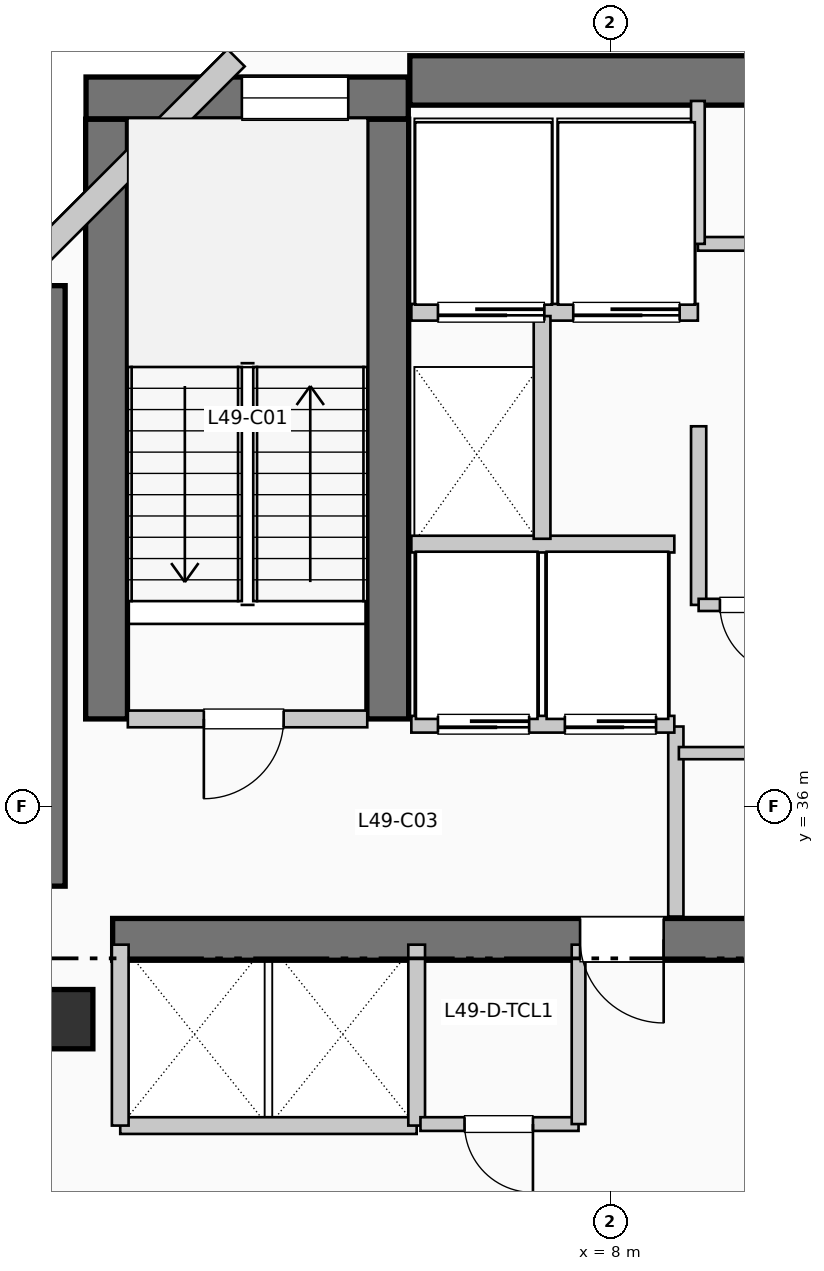
"""IFC4 building model, lengths in metres.
Left out: names, types, materials, properties, quantities, classifications, styles, units other than length and angle.
Written with IfcOpenShell. Run it as: python <this file> out.ifc"""

import sys

from ifc_helpers import new_model, si_unit, direction, frame, frame_2d, origin, origin_2d, place, context, subcontext, project, spatial, rectangle, extrude, element, fill, save


model = new_model("IFC4")
c1 = context("Model", 3, precision=1e-05, world=origin(), true_north=direction((0.0, 1.0)))
c2 = subcontext(c1, "Body", "Model", "MODEL_VIEW")
j1 = project(units=[si_unit("LENGTHUNIT", "METRE"), si_unit("PLANEANGLEUNIT", "RADIAN")], contexts=[c1])
p1 = place(None, origin())
s1 = spatial("IfcSite", under=j1, at=p1, CompositionType="ELEMENT")
p2 = place(p1, origin())
s2 = spatial("IfcBuilding", under=s1, at=p2, CompositionType="ELEMENT")
p3 = place(p2, frame((0.0, 0.0, 203.28)))
s3 = spatial("IfcBuildingStorey", under=s2, at=p3, CompositionType="ELEMENT", Elevation=203.28)
p4 = place(p3, frame((5.36, 45.55, 0.0), z_axis=(0.0, 0.0, 1.0), x_axis=(1.0, 0.0, 0.0)))
e1 = element("IfcWall", 1, at=p4, inside=s3, PredefinedType="SHEAR", context=c2, shape_type="SweptSolid", body=[
    extrude(rectangle(XDim=13.98, YDim=0.65, at=frame_2d((6.99, 0.0))), origin(), (0.0, 0.0, 1.0), 3.96),
])
p5 = place(p3, frame((0.5, 34.95, 0.0), z_axis=(0.0, 0.0, 1.0), x_axis=(0.0, 1.0, 0.0)))
e2 = element("IfcWall", 2, at=p5, inside=s3, PredefinedType="SHEAR", context=c2, shape_type="SweptSolid", body=[
    extrude(rectangle(XDim=7.9, YDim=0.65, at=frame_2d((3.95, 0.0))), origin(), (0.0, 0.0, 1.0), 3.96),
])
p6 = place(p3, frame((1.45, 34.25, 0.0), z_axis=(0.0, 0.0, 1.0), x_axis=(1.0, 0.0, 0.0)))
e3 = element("IfcWall", 3, at=p6, inside=s3, PredefinedType="SHEAR", context=c2, shape_type="SweptSolid", body=[
    extrude(rectangle(XDim=10.71, YDim=0.55, at=frame_2d((5.355, 0.0))), origin(), (0.0, 0.0, 1.0), 3.96),
])
p7 = place(p6, frame((7.25, 0.0, 0.0), z_axis=(0.0, 0.0, 1.0), x_axis=(-1.0, 0.0, 0.0)))
e4 = element("IfcOpeningElement", 4, at=p7, cuts=e3, PredefinedType="OPENING", context=c2, shape_type="SweptSolid", body=[
    extrude(rectangle(XDim=1.1, YDim=2.15, at=frame_2d((0.55, 1.075))), frame((0.0, 0.285, 0.0), z_axis=(0.0, -1.0, 0.0), x_axis=(1.0, 0.0, 0.0)), (0.0, 0.0, 1.0), 0.57),
])
for number, where, z_axis, x_axis in (
    (5, (1.37, 37.15, 0.0), (0.0, 0.0, 1.0), (0.0, 1.0, 0.0)),
    (6, (5.07, 37.15, 0.0), (0.0, 0.0, 1.0), (0.0, 1.0, 0.0)),
):
    element("IfcWall", number, at=place(p3, frame(where, z_axis=z_axis, x_axis=x_axis)), inside=s3, PredefinedType="SHEAR", context=c2, shape_type="SweptSolid", body=[
        extrude(rectangle(XDim=7.89, YDim=0.55, at=frame_2d((3.945, 0.0))), origin(), (0.0, 0.0, 1.0), 3.96),
    ])
p8 = place(p3, frame((1.1, 45.32, 0.0), z_axis=(0.0, 0.0, 1.0), x_axis=(1.0, 0.0, 0.0)))
e7 = element("IfcWall", 7, at=p8, inside=s3, PredefinedType="SHEAR", context=c2, shape_type="SweptSolid", body=[
    extrude(rectangle(XDim=4.24, YDim=0.55, at=frame_2d((2.12, 0.0))), origin(), (0.0, 0.0, 1.0), 3.96),
])
p9 = place(p8, frame((2.05, 0.0, 1.05)))
e8 = element("IfcOpeningElement", 8, at=p9, cuts=e7, PredefinedType="OPENING", context=c2, shape_type="SweptSolid", body=[
    extrude(rectangle(XDim=1.4, YDim=1.8, at=frame_2d((0.7, 0.9))), frame((0.0, 0.285, 0.0), z_axis=(0.0, -1.0, 0.0), x_axis=(1.0, 0.0, 0.0)), (0.0, 0.0, 1.0), 0.57),
])
p10 = place(p3, frame((0.8, 33.2, 0.0), z_axis=(0.0, 0.0, 1.0), x_axis=(1.0, 0.0, 0.0)))
e9 = element("IfcColumn", 9, at=p10, inside=s3, PredefinedType="COLUMN", context=c2, shape_type="SweptSolid", body=[
    extrude(rectangle(XDim=0.78, YDim=0.78, at=origin_2d()), origin(), (0.0, 0.0, 1.0), 3.96),
])
p11 = place(p3, frame((3.074, 45.848, 0.0), z_axis=(0.0, 0.0, 1.0), x_axis=(-0.707106781187, -0.707106781187, 0.0)))
e10 = element("IfcWall", 10, at=p11, inside=s3, PredefinedType="SOLIDWALL", context=c2, shape_type="SweptSolid", body=[
    extrude(rectangle(XDim=4.133, YDim=0.32, at=frame_2d((2.066, 0.0))), origin(), (0.0, 0.0, 1.0), 3.71),
])
p12 = place(p3, frame((1.65, 37.15, 0.0), z_axis=(0.0, 0.0, 1.0), x_axis=(1.0, 0.0, 0.0)))
e11 = element("IfcWall", 11, at=p12, inside=s3, PredefinedType="PARTITIONING", context=c2, shape_type="SweptSolid", body=[
    extrude(rectangle(XDim=3.15, YDim=0.22, at=frame_2d((1.575, 0.0))), origin(), (0.0, 0.0, 1.0), 3.71),
])
p13 = place(p12, frame((2.05, 0.0, 0.0), z_axis=(0.0, 0.0, 1.0), x_axis=(-1.0, 0.0, 0.0)))
e12 = element("IfcOpeningElement", 12, at=p13, cuts=e11, PredefinedType="OPENING", context=c2, shape_type="SweptSolid", body=[
    extrude(rectangle(XDim=1.05, YDim=2.15, at=frame_2d((0.525, 1.075))), frame((0.0, 0.12, 0.0), z_axis=(0.0, -1.0, 0.0), x_axis=(1.0, 0.0, 0.0)), (0.0, 0.0, 1.0), 0.24),
])
p14 = place(p3, frame((8.86, 34.55, 0.0), z_axis=(0.0, 0.0, 1.0), x_axis=(0.0, 1.0, 0.0)))
e13 = element("IfcWall", 13, at=p14, inside=s3, PredefinedType="PARTITIONING", context=c2, shape_type="SweptSolid", body=[
    extrude(rectangle(XDim=2.5, YDim=0.2, at=frame_2d((1.25, 0.0))), origin(), (0.0, 0.0, 1.0), 3.71),
])
p15 = place(p3, frame((5.38, 37.08, 0.0), z_axis=(0.0, 0.0, 1.0), x_axis=(1.0, 0.0, 0.0)))
e14 = element("IfcWall", 14, at=p15, inside=s3, PredefinedType="PARTITIONING", context=c2, shape_type="SweptSolid", body=[
    extrude(rectangle(XDim=3.46, YDim=0.22, at=frame_2d((1.73, 0.0))), origin(), (0.0, 0.0, 1.0), 3.71),
])
p16 = place(p15, frame((1.55, 0.0, 0.0), z_axis=(0.0, 0.0, 1.0), x_axis=(-1.0, 0.0, 0.0)))
e15 = element("IfcOpeningElement", 15, at=p16, cuts=e14, PredefinedType="OPENING", context=c2, shape_type="SweptSolid", body=[
    extrude(rectangle(XDim=1.2, YDim=2.2, at=frame_2d((0.6, 1.1))), frame((0.0, 0.12, 0.0), z_axis=(0.0, -1.0, 0.0), x_axis=(1.0, 0.0, 0.0)), (0.0, 0.0, 1.0), 0.24),
])
p17 = place(p15, frame((3.22, 0.0, 0.0), z_axis=(0.0, 0.0, 1.0), x_axis=(-1.0, 0.0, 0.0)))
e16 = element("IfcOpeningElement", 16, at=p17, cuts=e14, PredefinedType="OPENING", context=c2, shape_type="SweptSolid", body=[
    extrude(rectangle(XDim=1.2, YDim=2.2, at=frame_2d((0.6, 1.1))), frame((0.0, 0.12, 0.0), z_axis=(0.0, -1.0, 0.0), x_axis=(1.0, 0.0, 0.0)), (0.0, 0.0, 1.0), 0.24),
])
p18 = place(p3, frame((5.38, 39.45, 0.0), z_axis=(0.0, 0.0, 1.0), x_axis=(1.0, 0.0, 0.0)))
e17 = element("IfcWall", 17, at=p18, inside=s3, PredefinedType="PARTITIONING", context=c2, shape_type="SweptSolid", body=[
    extrude(rectangle(XDim=3.46, YDim=0.22, at=frame_2d((1.73, 0.0))), origin(), (0.0, 0.0, 1.0), 3.71),
])
p19 = place(p3, frame((5.38, 42.5, 0.0), z_axis=(0.0, 0.0, 1.0), x_axis=(1.0, 0.0, 0.0)))
e18 = element("IfcWall", 18, at=p19, inside=s3, PredefinedType="PARTITIONING", context=c2, shape_type="SweptSolid", body=[
    extrude(rectangle(XDim=3.77, YDim=0.22, at=frame_2d((1.885, 0.0))), origin(), (0.0, 0.0, 1.0), 3.71),
])
p20 = place(p19, frame((1.75, 0.0, 0.0), z_axis=(0.0, 0.0, 1.0), x_axis=(-1.0, 0.0, 0.0)))
e19 = element("IfcOpeningElement", 19, at=p20, cuts=e18, PredefinedType="OPENING", context=c2, shape_type="SweptSolid", body=[
    extrude(rectangle(XDim=1.4, YDim=2.2, at=frame_2d((0.7, 1.1))), frame((0.0, 0.12, 0.0), z_axis=(0.0, -1.0, 0.0), x_axis=(1.0, 0.0, 0.0)), (0.0, 0.0, 1.0), 0.24),
])
p21 = place(p19, frame((3.53, 0.0, 0.0), z_axis=(0.0, 0.0, 1.0), x_axis=(-1.0, 0.0, 0.0)))
e20 = element("IfcOpeningElement", 20, at=p21, cuts=e18, PredefinedType="OPENING", context=c2, shape_type="SweptSolid", body=[
    extrude(rectangle(XDim=1.4, YDim=2.2, at=frame_2d((0.7, 1.1))), frame((0.0, 0.12, 0.0), z_axis=(0.0, -1.0, 0.0), x_axis=(1.0, 0.0, 0.0)), (0.0, 0.0, 1.0), 0.24),
])
p22 = place(p3, frame((7.1, 39.52, 0.0), z_axis=(0.0, 0.0, 1.0), x_axis=(0.0, 1.0, 0.0)))
e21 = element("IfcWall", 21, at=p22, inside=s3, PredefinedType="PARTITIONING", context=c2, shape_type="SweptSolid", body=[
    extrude(rectangle(XDim=2.93, YDim=0.22, at=frame_2d((1.465, 0.0))), origin(), (0.0, 0.0, 1.0), 3.71),
])
p23 = place(p3, frame((1.55, 31.8, 0.0), z_axis=(0.0, 0.0, 1.0), x_axis=(1.0, 0.0, 0.0)))
e22 = element("IfcWall", 22, at=p23, inside=s3, PredefinedType="PARTITIONING", context=c2, shape_type="SweptSolid", body=[
    extrude(rectangle(XDim=3.9, YDim=0.22, at=frame_2d((1.95, 0.0))), origin(), (0.0, 0.0, 1.0), 3.71),
])
for number, where, z_axis, x_axis in (
    (23, (1.55, 31.8, 0.0), (0.0, 0.0, 1.0), (0.0, 1.0, 0.0)),
    (24, (5.45, 31.8, 0.0), (0.0, 0.0, 1.0), (0.0, 1.0, 0.0)),
):
    element("IfcWall", number, at=place(p3, frame(where, z_axis=z_axis, x_axis=x_axis)), inside=s3, PredefinedType="PARTITIONING", context=c2, shape_type="SweptSolid", body=[
        extrude(rectangle(XDim=2.38, YDim=0.22, at=frame_2d((1.19, 0.0))), origin(), (0.0, 0.0, 1.0), 3.71),
    ])
p24 = place(p3, frame((9.16, 38.65, 0.0), z_axis=(0.0, 0.0, 1.0), x_axis=(0.0, 1.0, 0.0)))
e25 = element("IfcWall", 25, at=p24, inside=s3, PredefinedType="PARTITIONING", context=c2, shape_type="SweptSolid", body=[
    extrude(rectangle(XDim=2.35, YDim=0.2, at=frame_2d((1.175, 0.0))), origin(), (0.0, 0.0, 1.0), 3.71),
])
p25 = place(p3, frame((5.5, 31.82, 0.0), z_axis=(0.0, 0.0, 1.0), x_axis=(1.0, 0.0, 0.0)))
e26 = element("IfcWall", 26, at=p25, inside=s3, PredefinedType="PLUMBINGWALL", context=c2, shape_type="SweptSolid", body=[
    extrude(rectangle(XDim=2.08, YDim=0.18, at=frame_2d((1.04, 0.0))), origin(), (0.0, 0.0, 1.0), 3.71),
])
p26 = place(p25, frame((1.48, 0.0, 0.0), z_axis=(0.0, 0.0, 1.0), x_axis=(-1.0, 0.0, 0.0)))
e27 = element("IfcOpeningElement", 27, at=p26, cuts=e26, PredefinedType="OPENING", context=c2, shape_type="SweptSolid", body=[
    extrude(rectangle(XDim=0.9, YDim=2.1, at=frame_2d((0.45, 1.05))), frame((0.0, 0.1, 0.0), z_axis=(0.0, -1.0, 0.0), x_axis=(1.0, 0.0, 0.0)), (0.0, 0.0, 1.0), 0.2),
])
p27 = place(p3, frame((7.58, 31.82, 0.0), z_axis=(0.0, 0.0, 1.0), x_axis=(0.0, 1.0, 0.0)))
e28 = element("IfcWall", 28, at=p27, inside=s3, PredefinedType="PLUMBINGWALL", context=c2, shape_type="SweptSolid", body=[
    extrude(rectangle(XDim=2.36, YDim=0.18, at=frame_2d((1.18, 0.0))), origin(), (0.0, 0.0, 1.0), 3.71),
])
p28 = place(p3, frame((8.9, 36.7, 0.0), z_axis=(0.0, 0.0, 1.0), x_axis=(1.0, 0.0, 0.0)))
e29 = element("IfcWall", 29, at=p28, inside=s3, PredefinedType="PARTITIONING", context=c2, shape_type="SweptSolid", body=[
    extrude(rectangle(XDim=3.25, YDim=0.16, at=frame_2d((1.625, 0.0))), origin(), (0.0, 0.0, 1.0), 3.71),
])
p29 = place(p28, frame((1.1, 0.0, 0.0)))
e30 = element("IfcOpeningElement", 30, at=p29, cuts=e29, PredefinedType="OPENING", context=c2, shape_type="SweptSolid", body=[
    extrude(rectangle(XDim=0.95, YDim=2.15, at=frame_2d((0.475, 1.075))), frame((0.0, 0.09, 0.0), z_axis=(0.0, -1.0, 0.0), x_axis=(1.0, 0.0, 0.0)), (0.0, 0.0, 1.0), 0.18),
])
p30 = place(p3, frame((9.16, 38.65, 0.0), z_axis=(0.0, 0.0, 1.0), x_axis=(1.0, 0.0, 0.0)))
e31 = element("IfcWall", 31, at=p30, inside=s3, PredefinedType="PARTITIONING", context=c2, shape_type="SweptSolid", body=[
    extrude(rectangle(XDim=3.42, YDim=0.16, at=frame_2d((1.71, 0.0))), origin(), (0.0, 0.0, 1.0), 3.71),
])
p31 = place(p30, frame((1.18, 0.0, 0.0), z_axis=(0.0, 0.0, 1.0), x_axis=(-1.0, 0.0, 0.0)))
e32 = element("IfcOpeningElement", 32, at=p31, cuts=e31, PredefinedType="OPENING", context=c2, shape_type="SweptSolid", body=[
    extrude(rectangle(XDim=0.9, YDim=2.15, at=frame_2d((0.45, 1.075))), frame((0.0, 0.09, 0.0), z_axis=(0.0, -1.0, 0.0), x_axis=(1.0, 0.0, 0.0)), (0.0, 0.0, 1.0), 0.18),
])
p32 = place(p30, frame((2.6, 0.0, 0.0), z_axis=(0.0, 0.0, 1.0), x_axis=(-1.0, 0.0, 0.0)))
e33 = element("IfcOpeningElement", 33, at=p32, cuts=e31, PredefinedType="OPENING", context=c2, shape_type="SweptSolid", body=[
    extrude(rectangle(XDim=0.9, YDim=2.15, at=frame_2d((0.45, 1.075))), frame((0.0, 0.09, 0.0), z_axis=(0.0, -1.0, 0.0), x_axis=(1.0, 0.0, 0.0)), (0.0, 0.0, 1.0), 0.18),
])
p33 = place(p3, frame((9.15, 43.4, 0.0), z_axis=(0.0, 0.0, 1.0), x_axis=(1.0, 0.0, 0.0)))
e34 = element("IfcWall", 34, at=p33, inside=s3, PredefinedType="PLUMBINGWALL", context=c2, shape_type="SweptSolid", body=[
    extrude(rectangle(XDim=9.33, YDim=0.18, at=frame_2d((4.665, 0.0))), origin(), (0.0, 0.0, 1.0), 3.71),
])
p34 = place(p33, frame((0.72, 0.0, 0.0)))
e35 = element("IfcOpeningElement", 35, at=p34, cuts=e34, PredefinedType="OPENING", context=c2, shape_type="SweptSolid", body=[
    extrude(rectangle(XDim=0.92, YDim=2.1, at=frame_2d((0.46, 1.05))), frame((0.0, 0.1, 0.0), z_axis=(0.0, -1.0, 0.0), x_axis=(1.0, 0.0, 0.0)), (0.0, 0.0, 1.0), 0.2),
])
p35 = place(p33, frame((3.02, 0.0, 0.0)))
e36 = element("IfcOpeningElement", 36, at=p35, cuts=e34, PredefinedType="OPENING", context=c2, shape_type="SweptSolid", body=[
    extrude(rectangle(XDim=0.92, YDim=2.1, at=frame_2d((0.46, 1.05))), frame((0.0, 0.1, 0.0), z_axis=(0.0, -1.0, 0.0), x_axis=(1.0, 0.0, 0.0)), (0.0, 0.0, 1.0), 0.2),
])
p36 = place(p33, frame((5.34, 0.0, 0.0)))
e37 = element("IfcOpeningElement", 37, at=p36, cuts=e34, PredefinedType="OPENING", context=c2, shape_type="SweptSolid", body=[
    extrude(rectangle(XDim=0.92, YDim=2.1, at=frame_2d((0.46, 1.05))), frame((0.0, 0.1, 0.0), z_axis=(0.0, -1.0, 0.0), x_axis=(1.0, 0.0, 0.0)), (0.0, 0.0, 1.0), 0.2),
])
p37 = place(p33, frame((7.66, 0.0, 0.0)))
e38 = element("IfcOpeningElement", 38, at=p37, cuts=e34, PredefinedType="OPENING", context=c2, shape_type="SweptSolid", body=[
    extrude(rectangle(XDim=0.95, YDim=2.1, at=frame_2d((0.475, 1.05))), frame((0.0, 0.1, 0.0), z_axis=(0.0, -1.0, 0.0), x_axis=(1.0, 0.0, 0.0)), (0.0, 0.0, 1.0), 0.2),
])
p38 = place(p3, frame((9.15, 43.4, 0.0), z_axis=(0.0, 0.0, 1.0), x_axis=(0.0, 1.0, 0.0)))
e39 = element("IfcWall", 39, at=p38, inside=s3, PredefinedType="PLUMBINGWALL", context=c2, shape_type="SweptSolid", body=[
    extrude(rectangle(XDim=1.88, YDim=0.18, at=frame_2d((0.94, 0.0))), origin(), (0.0, 0.0, 1.0), 3.71),
])
p39 = place(p9, origin())
e40 = element("IfcWindow", 40, at=p39, inside=s3, PartitioningType="SINGLE_PANEL", PredefinedType="WINDOW", context=c2, shape_type="SweptSolid", body=[
    extrude(rectangle(XDim=1.4, YDim=1.8, at=frame_2d((0.7, 0.9))), frame((0.0, 0.03, 0.0), z_axis=(0.0, -1.0, 0.0), x_axis=(1.0, 0.0, 0.0)), (0.0, 0.0, 1.0), 0.06),
])
fill(e8, e40)
p40 = place(p13, origin())
e41 = element("IfcDoor", 41, at=p40, inside=s3, OperationType="SINGLE_SWING_LEFT", PredefinedType="DOOR", context=c2, shape_type="SweptSolid", body=[
    extrude(rectangle(XDim=1.05, YDim=2.15, at=frame_2d((0.525, 1.075))), frame((0.0, 0.025, 0.0), z_axis=(0.0, -1.0, 0.0), x_axis=(1.0, 0.0, 0.0)), (0.0, 0.0, 1.0), 0.05),
])
fill(e12, e41)
p41 = place(p7, origin())
e42 = element("IfcDoor", 42, at=p41, inside=s3, OperationType="SINGLE_SWING_RIGHT", PredefinedType="DOOR", context=c2, shape_type="SweptSolid", body=[
    extrude(rectangle(XDim=1.1, YDim=2.15, at=frame_2d((0.55, 1.075))), frame((0.0, 0.025, 0.0), z_axis=(0.0, -1.0, 0.0), x_axis=(1.0, 0.0, 0.0)), (0.0, 0.0, 1.0), 0.05),
])
fill(e4, e42)
p42 = place(p16, origin())
e43 = element("IfcDoor", 43, at=p42, inside=s3, OperationType="SLIDING_TO_RIGHT", PredefinedType="DOOR", context=c2, shape_type="SweptSolid", body=[
    extrude(rectangle(XDim=1.2, YDim=2.2, at=frame_2d((0.6, 1.1))), frame((0.0, 0.025, 0.0), z_axis=(0.0, -1.0, 0.0), x_axis=(1.0, 0.0, 0.0)), (0.0, 0.0, 1.0), 0.05),
])
fill(e15, e43)
p43 = place(p17, origin())
e44 = element("IfcDoor", 44, at=p43, inside=s3, OperationType="SLIDING_TO_RIGHT", PredefinedType="DOOR", context=c2, shape_type="SweptSolid", body=[
    extrude(rectangle(XDim=1.2, YDim=2.2, at=frame_2d((0.6, 1.1))), frame((0.0, 0.025, 0.0), z_axis=(0.0, -1.0, 0.0), x_axis=(1.0, 0.0, 0.0)), (0.0, 0.0, 1.0), 0.05),
])
fill(e16, e44)
p44 = place(p20, origin())
e45 = element("IfcDoor", 45, at=p44, inside=s3, OperationType="SLIDING_TO_LEFT", PredefinedType="DOOR", context=c2, shape_type="SweptSolid", body=[
    extrude(rectangle(XDim=1.4, YDim=2.2, at=frame_2d((0.7, 1.1))), frame((0.0, 0.025, 0.0), z_axis=(0.0, -1.0, 0.0), x_axis=(1.0, 0.0, 0.0)), (0.0, 0.0, 1.0), 0.05),
])
fill(e19, e45)
p45 = place(p21, origin())
e46 = element("IfcDoor", 46, at=p45, inside=s3, OperationType="SLIDING_TO_LEFT", PredefinedType="DOOR", context=c2, shape_type="SweptSolid", body=[
    extrude(rectangle(XDim=1.4, YDim=2.2, at=frame_2d((0.7, 1.1))), frame((0.0, 0.025, 0.0), z_axis=(0.0, -1.0, 0.0), x_axis=(1.0, 0.0, 0.0)), (0.0, 0.0, 1.0), 0.05),
])
fill(e20, e46)
p46 = place(p26, origin())
e47 = element("IfcDoor", 47, at=p46, inside=s3, OperationType="SINGLE_SWING_RIGHT", PredefinedType="DOOR", context=c2, shape_type="SweptSolid", body=[
    extrude(rectangle(XDim=0.9, YDim=2.1, at=frame_2d((0.45, 1.05))), frame((0.0, 0.025, 0.0), z_axis=(0.0, -1.0, 0.0), x_axis=(1.0, 0.0, 0.0)), (0.0, 0.0, 1.0), 0.05),
])
fill(e27, e47)
p47 = place(p31, origin())
e48 = element("IfcDoor", 48, at=p47, inside=s3, OperationType="SINGLE_SWING_RIGHT", PredefinedType="DOOR", context=c2, shape_type="SweptSolid", body=[
    extrude(rectangle(XDim=0.9, YDim=2.15, at=frame_2d((0.45, 1.075))), frame((0.0, 0.025, 0.0), z_axis=(0.0, -1.0, 0.0), x_axis=(1.0, 0.0, 0.0)), (0.0, 0.0, 1.0), 0.05),
])
fill(e32, e48)
save(model, sys.argv[1])
